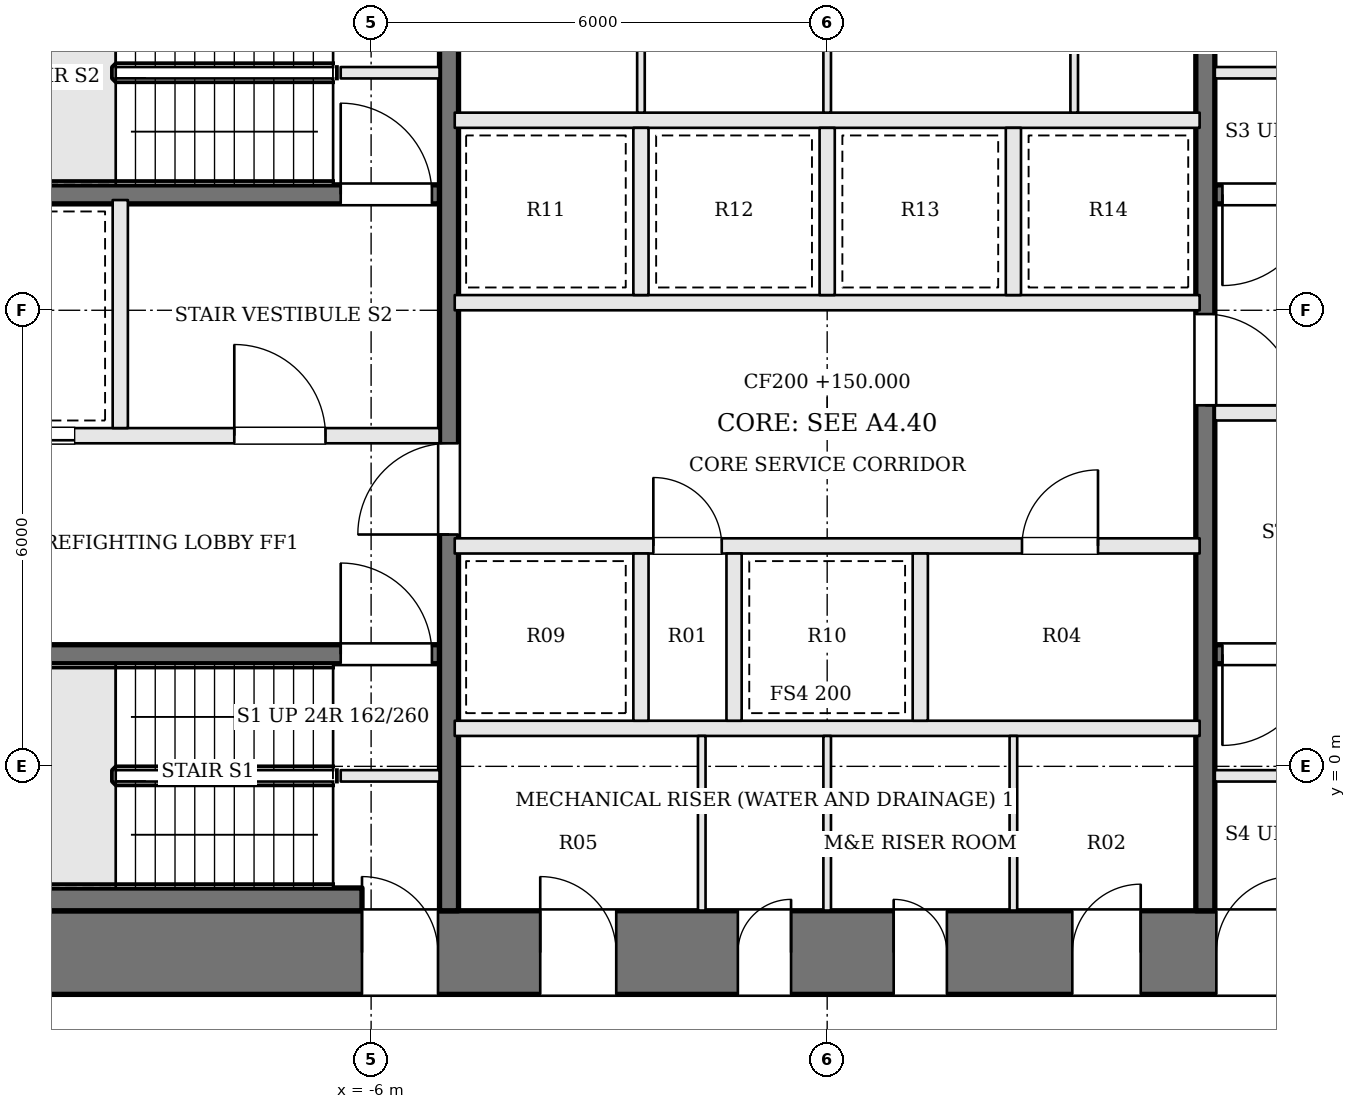
"""IFC4 building model, lengths in metres.
Left out: names, types, materials, properties, quantities, classifications, styles, units other than length and angle.
Written with IfcOpenShell. Run it as: python <this file> out.ifc"""

import sys

from ifc_helpers import new_model, si_unit, direction, frame, frame_2d, origin, place, context, subcontext, project, spatial, rectangle, extrude, element, fill, save


model = new_model("IFC4")
c1 = context("Model", 3, precision=1e-05, world=origin(), true_north=direction((0.0, 1.0)))
c2 = subcontext(c1, "Body", "Model", "MODEL_VIEW")
j1 = project(units=[si_unit("LENGTHUNIT", "METRE"), si_unit("PLANEANGLEUNIT", "RADIAN")], contexts=[c1])
p1 = place(None, origin())
s1 = spatial("IfcSite", under=j1, at=p1, CompositionType="ELEMENT")
p2 = place(p1, origin())
s2 = spatial("IfcBuilding", under=s1, at=p2, CompositionType="ELEMENT")
p3 = place(p2, frame((0.0, 0.0, 150.0)))
s3 = spatial("IfcBuildingStorey", under=s2, at=p3, CompositionType="ELEMENT", Elevation=150.0)
p4 = place(p3, frame((-13.0, -2.45, 0.0), z_axis=(0.0, 0.0, 1.0), x_axis=(1.0, 0.0, 0.0)))
e1 = element("IfcWall", 1, at=p4, inside=s3, PredefinedType="SHEAR", context=c2, shape_type="SweptSolid", body=[
    extrude(rectangle(XDim=26.0, YDim=1.1, at=frame_2d((13.0, 0.0))), origin(), (0.0, 0.0, 1.0), 3.9),
])
p5 = place(p4, frame((9.225, 0.0, 0.0)))
e2 = element("IfcOpeningElement", 2, at=p5, cuts=e1, PredefinedType="OPENING", context=c2, shape_type="SweptSolid", body=[
    extrude(rectangle(XDim=1.0, YDim=2.1, at=frame_2d((0.5, 1.05))), frame((0.0, 0.56, 0.0), z_axis=(0.0, -1.0, 0.0), x_axis=(1.0, 0.0, 0.0)), (0.0, 0.0, 1.0), 1.12),
])
p6 = place(p4, frame((11.825, 0.0, 0.0)))
e3 = element("IfcOpeningElement", 3, at=p6, cuts=e1, PredefinedType="OPENING", context=c2, shape_type="SweptSolid", body=[
    extrude(rectangle(XDim=0.7, YDim=2.1, at=frame_2d((0.35, 1.05))), frame((0.0, 0.56, 0.0), z_axis=(0.0, -1.0, 0.0), x_axis=(1.0, 0.0, 0.0)), (0.0, 0.0, 1.0), 1.12),
])
p7 = place(p4, frame((13.875, 0.0, 0.0)))
e4 = element("IfcOpeningElement", 4, at=p7, cuts=e1, PredefinedType="OPENING", context=c2, shape_type="SweptSolid", body=[
    extrude(rectangle(XDim=0.7, YDim=2.1, at=frame_2d((0.35, 1.05))), frame((0.0, 0.56, 0.0), z_axis=(0.0, -1.0, 0.0), x_axis=(1.0, 0.0, 0.0)), (0.0, 0.0, 1.0), 1.12),
])
p8 = place(p4, frame((16.225, 0.0, 0.0)))
e5 = element("IfcOpeningElement", 5, at=p8, cuts=e1, PredefinedType="OPENING", context=c2, shape_type="SweptSolid", body=[
    extrude(rectangle(XDim=0.9, YDim=2.1, at=frame_2d((0.45, 1.05))), frame((0.0, 0.56, 0.0), z_axis=(0.0, -1.0, 0.0), x_axis=(1.0, 0.0, 0.0)), (0.0, 0.0, 1.0), 1.12),
])
p9 = place(p4, frame((6.88, 0.0, 0.0)))
e6 = element("IfcOpeningElement", 6, at=p9, cuts=e1, PredefinedType="OPENING", context=c2, shape_type="SweptSolid", body=[
    extrude(rectangle(XDim=1.0, YDim=2.1, at=frame_2d((0.5, 1.05))), frame((0.0, 0.56, 0.0), z_axis=(0.0, -1.0, 0.0), x_axis=(1.0, 0.0, 0.0)), (0.0, 0.0, 1.0), 1.12),
])
p10 = place(p4, frame((18.12, 0.0, 0.0)))
e7 = element("IfcOpeningElement", 7, at=p10, cuts=e1, PredefinedType="OPENING", context=c2, shape_type="SweptSolid", body=[
    extrude(rectangle(XDim=1.0, YDim=2.1, at=frame_2d((0.5, 1.05))), frame((0.0, 0.56, 0.0), z_axis=(0.0, -1.0, 0.0), x_axis=(1.0, 0.0, 0.0)), (0.0, 0.0, 1.0), 1.12),
])
for number, where, z_axis, x_axis in (
    (8, (-6.4, -0.125, 0.0), (0.0, 0.0, 1.0), (1.0, 0.0, 0.0)),
    (9, (6.4, 9.125, 0.0), (0.0, 0.0, 1.0), (-1.0, 0.0, 0.0)),
    (10, (-6.4, 9.125, 0.0), (0.0, 0.0, 1.0), (1.0, 0.0, 0.0)),
    (11, (6.4, -0.125, 0.0), (0.0, 0.0, 1.0), (-1.0, 0.0, 0.0)),
):
    element("IfcWall", number, at=place(p3, frame(where, z_axis=z_axis, x_axis=x_axis)), inside=s3, PredefinedType="SOLIDWALL", context=c2, shape_type="SweptSolid", body=[
        extrude(rectangle(XDim=1.3, YDim=0.15, at=frame_2d((0.65, 0.0))), origin(), (0.0, 0.0, 1.0), 3.7),
    ])
p11 = place(p3, frame((-11.9, 1.475, 0.0), z_axis=(0.0, 0.0, 1.0), x_axis=(1.0, 0.0, 0.0)))
e12 = element("IfcWall", 12, at=p11, inside=s3, PredefinedType="SOLIDWALL", context=c2, shape_type="SweptSolid", body=[
    extrude(rectangle(XDim=6.8, YDim=0.25, at=frame_2d((3.4, 0.0))), origin(), (0.0, 0.0, 1.0), 3.7),
])
p12 = place(p11, frame((5.5, 0.0, 0.0)))
e13 = element("IfcOpeningElement", 13, at=p12, cuts=e12, PredefinedType="OPENING", context=c2, shape_type="SweptSolid", body=[
    extrude(rectangle(XDim=1.2, YDim=2.1, at=frame_2d((0.6, 1.05))), frame((0.0, 0.135, 0.0), z_axis=(0.0, -1.0, 0.0), x_axis=(1.0, 0.0, 0.0)), (0.0, 0.0, 1.0), 0.27),
])
p13 = place(p3, frame((11.9, 7.525, 0.0), z_axis=(0.0, 0.0, 1.0), x_axis=(-1.0, 0.0, 0.0)))
e14 = element("IfcWall", 14, at=p13, inside=s3, PredefinedType="SOLIDWALL", context=c2, shape_type="SweptSolid", body=[
    extrude(rectangle(XDim=6.8, YDim=0.25, at=frame_2d((3.4, 0.0))), origin(), (0.0, 0.0, 1.0), 3.7),
])
p14 = place(p13, frame((5.5, 0.0, 0.0)))
e15 = element("IfcOpeningElement", 15, at=p14, cuts=e14, PredefinedType="OPENING", context=c2, shape_type="SweptSolid", body=[
    extrude(rectangle(XDim=1.2, YDim=2.1, at=frame_2d((0.6, 1.05))), frame((0.0, 0.135, 0.0), z_axis=(0.0, -1.0, 0.0), x_axis=(1.0, 0.0, 0.0)), (0.0, 0.0, 1.0), 0.27),
])
p15 = place(p3, frame((-11.9, 4.35, 0.0), z_axis=(0.0, 0.0, 1.0), x_axis=(1.0, 0.0, 0.0)))
e16 = element("IfcWall", 16, at=p15, inside=s3, PredefinedType="SOLIDWALL", context=c2, shape_type="SweptSolid", body=[
    extrude(rectangle(XDim=6.8, YDim=0.2, at=frame_2d((3.4, 0.0))), origin(), (0.0, 0.0, 1.0), 3.7),
])
p16 = place(p15, frame((4.1, 0.0, 0.0)))
e17 = element("IfcOpeningElement", 17, at=p16, cuts=e16, PredefinedType="OPENING", context=c2, shape_type="SweptSolid", body=[
    extrude(rectangle(XDim=1.2, YDim=2.1, at=frame_2d((0.6, 1.05))), frame((0.0, 0.11, 0.0), z_axis=(0.0, -1.0, 0.0), x_axis=(1.0, 0.0, 0.0)), (0.0, 0.0, 1.0), 0.22),
])
p17 = place(p15, frame((0.8, 0.0, 0.0)))
e18 = element("IfcOpeningElement", 18, at=p17, cuts=e16, PredefinedType="OPENING", context=c2, shape_type="SweptSolid", body=[
    extrude(rectangle(XDim=1.2, YDim=2.1, at=frame_2d((0.6, 1.05))), frame((0.0, 0.11, 0.0), z_axis=(0.0, -1.0, 0.0), x_axis=(1.0, 0.0, 0.0)), (0.0, 0.0, 1.0), 0.22),
])
p18 = place(p3, frame((11.9, 4.65, 0.0), z_axis=(0.0, 0.0, 1.0), x_axis=(-1.0, 0.0, 0.0)))
e19 = element("IfcWall", 19, at=p18, inside=s3, PredefinedType="SOLIDWALL", context=c2, shape_type="SweptSolid", body=[
    extrude(rectangle(XDim=6.8, YDim=0.2, at=frame_2d((3.4, 0.0))), origin(), (0.0, 0.0, 1.0), 3.7),
])
p19 = place(p18, frame((4.1, 0.0, 0.0)))
e20 = element("IfcOpeningElement", 20, at=p19, cuts=e19, PredefinedType="OPENING", context=c2, shape_type="SweptSolid", body=[
    extrude(rectangle(XDim=1.2, YDim=2.1, at=frame_2d((0.6, 1.05))), frame((0.0, 0.11, 0.0), z_axis=(0.0, -1.0, 0.0), x_axis=(1.0, 0.0, 0.0)), (0.0, 0.0, 1.0), 0.22),
])
p20 = place(p18, frame((0.8, 0.0, 0.0)))
e21 = element("IfcOpeningElement", 21, at=p20, cuts=e19, PredefinedType="OPENING", context=c2, shape_type="SweptSolid", body=[
    extrude(rectangle(XDim=1.2, YDim=2.1, at=frame_2d((0.6, 1.05))), frame((0.0, 0.11, 0.0), z_axis=(0.0, -1.0, 0.0), x_axis=(1.0, 0.0, 0.0)), (0.0, 0.0, 1.0), 0.22),
])
p21 = place(p3, frame((-11.9, 7.525, 0.0), z_axis=(0.0, 0.0, 1.0), x_axis=(1.0, 0.0, 0.0)))
e22 = element("IfcWall", 22, at=p21, inside=s3, PredefinedType="SOLIDWALL", context=c2, shape_type="SweptSolid", body=[
    extrude(rectangle(XDim=6.8, YDim=0.25, at=frame_2d((3.4, 0.0))), origin(), (0.0, 0.0, 1.0), 3.7),
])
p22 = place(p21, frame((5.5, 0.0, 0.0)))
e23 = element("IfcOpeningElement", 23, at=p22, cuts=e22, PredefinedType="OPENING", context=c2, shape_type="SweptSolid", body=[
    extrude(rectangle(XDim=1.2, YDim=2.1, at=frame_2d((0.6, 1.05))), frame((0.0, 0.135, 0.0), z_axis=(0.0, -1.0, 0.0), x_axis=(1.0, 0.0, 0.0)), (0.0, 0.0, 1.0), 0.27),
])
p23 = place(p3, frame((11.9, 1.475, 0.0), z_axis=(0.0, 0.0, 1.0), x_axis=(-1.0, 0.0, 0.0)))
e24 = element("IfcWall", 24, at=p23, inside=s3, PredefinedType="SOLIDWALL", context=c2, shape_type="SweptSolid", body=[
    extrude(rectangle(XDim=6.8, YDim=0.25, at=frame_2d((3.4, 0.0))), origin(), (0.0, 0.0, 1.0), 3.7),
])
p24 = place(p23, frame((5.5, 0.0, 0.0)))
e25 = element("IfcOpeningElement", 25, at=p24, cuts=e24, PredefinedType="OPENING", context=c2, shape_type="SweptSolid", body=[
    extrude(rectangle(XDim=1.2, YDim=2.1, at=frame_2d((0.6, 1.05))), frame((0.0, 0.135, 0.0), z_axis=(0.0, -1.0, 0.0), x_axis=(1.0, 0.0, 0.0)), (0.0, 0.0, 1.0), 0.27),
])
p25 = place(p3, frame((-9.3, 4.45, 0.0), z_axis=(0.0, 0.0, 1.0), x_axis=(0.0, 1.0, 0.0)))
e26 = element("IfcWall", 26, at=p25, inside=s3, PredefinedType="SOLIDWALL", context=c2, shape_type="SweptSolid", body=[
    extrude(rectangle(XDim=3.0, YDim=0.2, at=frame_2d((1.5, 0.0))), origin(), (0.0, 0.0, 1.0), 3.7),
])
p26 = place(p3, frame((-4.975, -1.9, 0.0), z_axis=(0.0, 0.0, 1.0), x_axis=(0.0, 1.0, 0.0)))
e27 = element("IfcWall", 27, at=p26, inside=s3, PredefinedType="SOLIDWALL", context=c2, shape_type="SweptSolid", body=[
    extrude(rectangle(XDim=12.8, YDim=0.25, at=frame_2d((6.4, 0.0))), origin(), (0.0, 0.0, 1.0), 3.7),
])
p27 = place(p26, frame((4.95, 0.0, 0.0)))
e28 = element("IfcOpeningElement", 28, at=p27, cuts=e27, PredefinedType="OPENING", context=c2, shape_type="SweptSolid", body=[
    extrude(rectangle(XDim=1.2, YDim=2.1, at=frame_2d((0.6, 1.05))), frame((0.0, 0.135, 0.0), z_axis=(0.0, -1.0, 0.0), x_axis=(1.0, 0.0, 0.0)), (0.0, 0.0, 1.0), 0.27),
])
p28 = place(p3, frame((4.975, 10.9, 0.0), z_axis=(0.0, 0.0, 1.0), x_axis=(0.0, -1.0, 0.0)))
e29 = element("IfcWall", 29, at=p28, inside=s3, PredefinedType="SOLIDWALL", context=c2, shape_type="SweptSolid", body=[
    extrude(rectangle(XDim=12.8, YDim=0.25, at=frame_2d((6.4, 0.0))), origin(), (0.0, 0.0, 1.0), 3.7),
])
p29 = place(p28, frame((4.95, 0.0, 0.0)))
e30 = element("IfcOpeningElement", 30, at=p29, cuts=e29, PredefinedType="OPENING", context=c2, shape_type="SweptSolid", body=[
    extrude(rectangle(XDim=1.2, YDim=2.1, at=frame_2d((0.6, 1.05))), frame((0.0, 0.135, 0.0), z_axis=(0.0, -1.0, 0.0), x_axis=(1.0, 0.0, 0.0)), (0.0, 0.0, 1.0), 0.27),
])
p30 = place(p3, frame((-11.9, -1.75, 0.0), z_axis=(0.0, 0.0, 1.0), x_axis=(1.0, 0.0, 0.0)))
e31 = element("IfcWall", 31, at=p30, inside=s3, PredefinedType="SOLIDWALL", context=c2, shape_type="SweptSolid", body=[
    extrude(rectangle(XDim=5.78, YDim=0.3, at=frame_2d((2.89, 0.0))), origin(), (0.0, 0.0, 1.0), 3.7),
])
p31 = place(p3, frame((-4.9, 0.5, 0.0), z_axis=(0.0, 0.0, 1.0), x_axis=(1.0, 0.0, 0.0)))
e32 = element("IfcWall", 32, at=p31, inside=s3, PredefinedType="SOLIDWALL", context=c2, shape_type="SweptSolid", body=[
    extrude(rectangle(XDim=9.8, YDim=0.2, at=frame_2d((4.9, 0.0))), origin(), (0.0, 0.0, 1.0), 3.7),
])
p32 = place(p3, frame((-4.9, 2.9, 0.0), z_axis=(0.0, 0.0, 1.0), x_axis=(1.0, 0.0, 0.0)))
e33 = element("IfcWall", 33, at=p32, inside=s3, PredefinedType="SOLIDWALL", context=c2, shape_type="SweptSolid", body=[
    extrude(rectangle(XDim=9.8, YDim=0.2, at=frame_2d((4.9, 0.0))), origin(), (0.0, 0.0, 1.0), 3.7),
])
p33 = place(p32, frame((2.613, 0.0, 0.0)))
e34 = element("IfcOpeningElement", 34, at=p33, cuts=e33, PredefinedType="OPENING", context=c2, shape_type="SweptSolid", body=[
    extrude(rectangle(XDim=0.9, YDim=2.1, at=frame_2d((0.45, 1.05))), frame((0.0, 0.11, 0.0), z_axis=(0.0, -1.0, 0.0), x_axis=(1.0, 0.0, 0.0)), (0.0, 0.0, 1.0), 0.22),
])
p34 = place(p32, frame((7.463, 0.0, 0.0)))
e35 = element("IfcOpeningElement", 35, at=p34, cuts=e33, PredefinedType="OPENING", context=c2, shape_type="SweptSolid", body=[
    extrude(rectangle(XDim=1.0, YDim=2.1, at=frame_2d((0.5, 1.05))), frame((0.0, 0.11, 0.0), z_axis=(0.0, -1.0, 0.0), x_axis=(1.0, 0.0, 0.0)), (0.0, 0.0, 1.0), 0.22),
])
for number, where, z_axis, x_axis in (
    (36, (-4.9, 6.1, 0.0), (0.0, 0.0, 1.0), (1.0, 0.0, 0.0)),
    (37, (-4.9, 8.5, 0.0), (0.0, 0.0, 1.0), (1.0, 0.0, 0.0)),
):
    element("IfcWall", number, at=place(p3, frame(where, z_axis=z_axis, x_axis=x_axis)), inside=s3, PredefinedType="SOLIDWALL", context=c2, shape_type="SweptSolid", body=[
        extrude(rectangle(XDim=9.8, YDim=0.2, at=frame_2d((4.9, 0.0))), origin(), (0.0, 0.0, 1.0), 3.7),
    ])
for number, where, z_axis, x_axis in (
    (38, (-2.45, 0.6, 0.0), (0.0, 0.0, 1.0), (0.0, 1.0, 0.0)),
    (39, (-1.225, 0.6, 0.0), (0.0, 0.0, 1.0), (0.0, 1.0, 0.0)),
    (40, (1.225, 0.6, 0.0), (0.0, 0.0, 1.0), (0.0, 1.0, 0.0)),
    (41, (-2.45, 6.2, 0.0), (0.0, 0.0, 1.0), (0.0, 1.0, 0.0)),
    (42, (0.0, 6.2, 0.0), (0.0, 0.0, 1.0), (0.0, 1.0, 0.0)),
    (43, (2.45, 6.2, 0.0), (0.0, 0.0, 1.0), (0.0, 1.0, 0.0)),
):
    element("IfcWall", number, at=place(p3, frame(where, z_axis=z_axis, x_axis=x_axis)), inside=s3, PredefinedType="SOLIDWALL", context=c2, shape_type="SweptSolid", body=[
        extrude(rectangle(XDim=2.2, YDim=0.2, at=frame_2d((1.1, 0.0))), origin(), (0.0, 0.0, 1.0), 3.7),
    ])
for number, where, z_axis, x_axis in (
    (44, (-1.65, -1.9, 0.0), (0.0, 0.0, 1.0), (0.0, 1.0, 0.0)),
    (45, (0.0, -1.9, 0.0), (0.0, 0.0, 1.0), (0.0, 1.0, 0.0)),
    (46, (2.45, -1.9, 0.0), (0.0, 0.0, 1.0), (0.0, 1.0, 0.0)),
    (47, (-2.45, 8.6, 0.0), (0.0, 0.0, 1.0), (0.0, 1.0, 0.0)),
    (48, (0.0, 8.6, 0.0), (0.0, 0.0, 1.0), (0.0, 1.0, 0.0)),
    (49, (3.25, 8.6, 0.0), (0.0, 0.0, 1.0), (0.0, 1.0, 0.0)),
):
    element("IfcWall", number, at=place(p3, frame(where, z_axis=z_axis, x_axis=x_axis)), inside=s3, PredefinedType="PARTITIONING", context=c2, shape_type="SweptSolid", body=[
        extrude(rectangle(XDim=2.3, YDim=0.1, at=frame_2d((1.15, 0.0))), origin(), (0.0, 0.0, 1.0), 3.7),
    ])
p35 = place(p27, origin())
e50 = element("IfcDoor", 50, at=p35, inside=s3, OperationType="SINGLE_SWING_LEFT", PredefinedType="DOOR", context=c2, shape_type="SweptSolid", body=[
    extrude(rectangle(XDim=1.2, YDim=2.1, at=frame_2d((0.6, 1.05))), frame((0.0, 0.025, 0.0), z_axis=(0.0, -1.0, 0.0), x_axis=(1.0, 0.0, 0.0)), (0.0, 0.0, 1.0), 0.05),
])
fill(e28, e50)
p36 = place(p29, origin())
e51 = element("IfcDoor", 51, at=p36, inside=s3, OperationType="SINGLE_SWING_RIGHT", PredefinedType="DOOR", context=c2, shape_type="SweptSolid", body=[
    extrude(rectangle(XDim=1.2, YDim=2.1, at=frame_2d((0.6, 1.05))), frame((0.0, 0.025, 0.0), z_axis=(0.0, -1.0, 0.0), x_axis=(1.0, 0.0, 0.0)), (0.0, 0.0, 1.0), 0.05),
])
fill(e30, e51)
p37 = place(p16, origin())
e52 = element("IfcDoor", 52, at=p37, inside=s3, OperationType="SINGLE_SWING_LEFT", PredefinedType="DOOR", context=c2, shape_type="SweptSolid", body=[
    extrude(rectangle(XDim=1.2, YDim=2.1, at=frame_2d((0.6, 1.05))), frame((0.0, 0.025, 0.0), z_axis=(0.0, -1.0, 0.0), x_axis=(1.0, 0.0, 0.0)), (0.0, 0.0, 1.0), 0.05),
])
fill(e17, e52)
p38 = place(p12, origin())
e53 = element("IfcDoor", 53, at=p38, inside=s3, OperationType="SINGLE_SWING_LEFT", PredefinedType="DOOR", context=c2, shape_type="SweptSolid", body=[
    extrude(rectangle(XDim=1.2, YDim=2.1, at=frame_2d((0.6, 1.05))), frame((0.0, 0.025, 0.0), z_axis=(0.0, -1.0, 0.0), x_axis=(1.0, 0.0, 0.0)), (0.0, 0.0, 1.0), 0.05),
])
fill(e13, e53)
p39 = place(p14, origin())
e54 = element("IfcDoor", 54, at=p39, inside=s3, OperationType="SINGLE_SWING_RIGHT", PredefinedType="DOOR", context=c2, shape_type="SweptSolid", body=[
    extrude(rectangle(XDim=1.2, YDim=2.1, at=frame_2d((0.6, 1.05))), frame((0.0, 0.025, 0.0), z_axis=(0.0, -1.0, 0.0), x_axis=(1.0, 0.0, 0.0)), (0.0, 0.0, 1.0), 0.05),
])
fill(e15, e54)
p40 = place(p22, origin())
e55 = element("IfcDoor", 55, at=p40, inside=s3, OperationType="SINGLE_SWING_LEFT", PredefinedType="DOOR", context=c2, shape_type="SweptSolid", body=[
    extrude(rectangle(XDim=1.2, YDim=2.1, at=frame_2d((0.6, 1.05))), frame((0.0, 0.025, 0.0), z_axis=(0.0, -1.0, 0.0), x_axis=(1.0, 0.0, 0.0)), (0.0, 0.0, 1.0), 0.05),
])
fill(e23, e55)
p41 = place(p24, origin())
e56 = element("IfcDoor", 56, at=p41, inside=s3, OperationType="SINGLE_SWING_RIGHT", PredefinedType="DOOR", context=c2, shape_type="SweptSolid", body=[
    extrude(rectangle(XDim=1.2, YDim=2.1, at=frame_2d((0.6, 1.05))), frame((0.0, 0.025, 0.0), z_axis=(0.0, -1.0, 0.0), x_axis=(1.0, 0.0, 0.0)), (0.0, 0.0, 1.0), 0.05),
])
fill(e25, e56)
p42 = place(p17, origin())
e57 = element("IfcDoor", 57, at=p42, inside=s3, OperationType="SLIDING_TO_RIGHT", PredefinedType="DOOR", context=c2, shape_type="SweptSolid", body=[
    extrude(rectangle(XDim=1.2, YDim=2.1, at=frame_2d((0.6, 1.05))), frame((0.0, 0.025, 0.0), z_axis=(0.0, -1.0, 0.0), x_axis=(1.0, 0.0, 0.0)), (0.0, 0.0, 1.0), 0.05),
])
fill(e18, e57)
p43 = place(p33, origin())
e58 = element("IfcDoor", 58, at=p43, inside=s3, OperationType="SINGLE_SWING_LEFT", PredefinedType="DOOR", context=c2, shape_type="SweptSolid", body=[
    extrude(rectangle(XDim=0.9, YDim=2.1, at=frame_2d((0.45, 1.05))), frame((0.0, 0.025, 0.0), z_axis=(0.0, -1.0, 0.0), x_axis=(1.0, 0.0, 0.0)), (0.0, 0.0, 1.0), 0.05),
])
fill(e34, e58)
p44 = place(p34, origin())
e59 = element("IfcDoor", 59, at=p44, inside=s3, OperationType="SINGLE_SWING_RIGHT", PredefinedType="DOOR", context=c2, shape_type="SweptSolid", body=[
    extrude(rectangle(XDim=1.0, YDim=2.1, at=frame_2d((0.5, 1.05))), frame((0.0, 0.025, 0.0), z_axis=(0.0, -1.0, 0.0), x_axis=(1.0, 0.0, 0.0)), (0.0, 0.0, 1.0), 0.05),
])
fill(e35, e59)
p45 = place(p5, origin())
e60 = element("IfcDoor", 60, at=p45, inside=s3, OperationType="SINGLE_SWING_LEFT", PredefinedType="DOOR", context=c2, shape_type="SweptSolid", body=[
    extrude(rectangle(XDim=1.0, YDim=2.1, at=frame_2d((0.5, 1.05))), frame((0.0, 0.025, 0.0), z_axis=(0.0, -1.0, 0.0), x_axis=(1.0, 0.0, 0.0)), (0.0, 0.0, 1.0), 0.05),
])
fill(e2, e60)
p46 = place(p6, origin())
e61 = element("IfcDoor", 61, at=p46, inside=s3, OperationType="SINGLE_SWING_RIGHT", PredefinedType="DOOR", context=c2, shape_type="SweptSolid", body=[
    extrude(rectangle(XDim=0.7, YDim=2.1, at=frame_2d((0.35, 1.05))), frame((0.0, 0.025, 0.0), z_axis=(0.0, -1.0, 0.0), x_axis=(1.0, 0.0, 0.0)), (0.0, 0.0, 1.0), 0.05),
])
fill(e3, e61)
p47 = place(p7, origin())
e62 = element("IfcDoor", 62, at=p47, inside=s3, OperationType="SINGLE_SWING_LEFT", PredefinedType="DOOR", context=c2, shape_type="SweptSolid", body=[
    extrude(rectangle(XDim=0.7, YDim=2.1, at=frame_2d((0.35, 1.05))), frame((0.0, 0.025, 0.0), z_axis=(0.0, -1.0, 0.0), x_axis=(1.0, 0.0, 0.0)), (0.0, 0.0, 1.0), 0.05),
])
fill(e4, e62)
p48 = place(p8, origin())
e63 = element("IfcDoor", 63, at=p48, inside=s3, OperationType="SINGLE_SWING_RIGHT", PredefinedType="DOOR", context=c2, shape_type="SweptSolid", body=[
    extrude(rectangle(XDim=0.9, YDim=2.1, at=frame_2d((0.45, 1.05))), frame((0.0, 0.025, 0.0), z_axis=(0.0, -1.0, 0.0), x_axis=(1.0, 0.0, 0.0)), (0.0, 0.0, 1.0), 0.05),
])
fill(e5, e63)
p49 = place(p9, origin())
e64 = element("IfcDoor", 64, at=p49, inside=s3, OperationType="SINGLE_SWING_LEFT", PredefinedType="DOOR", context=c2, shape_type="SweptSolid", body=[
    extrude(rectangle(XDim=1.0, YDim=2.1, at=frame_2d((0.5, 1.05))), frame((0.0, 0.025, 0.0), z_axis=(0.0, -1.0, 0.0), x_axis=(1.0, 0.0, 0.0)), (0.0, 0.0, 1.0), 0.05),
])
fill(e6, e64)
p50 = place(p10, origin())
e65 = element("IfcDoor", 65, at=p50, inside=s3, OperationType="SINGLE_SWING_RIGHT", PredefinedType="DOOR", context=c2, shape_type="SweptSolid", body=[
    extrude(rectangle(XDim=1.0, YDim=2.1, at=frame_2d((0.5, 1.05))), frame((0.0, 0.025, 0.0), z_axis=(0.0, -1.0, 0.0), x_axis=(1.0, 0.0, 0.0)), (0.0, 0.0, 1.0), 0.05),
])
fill(e7, e65)
save(model, sys.argv[1])
